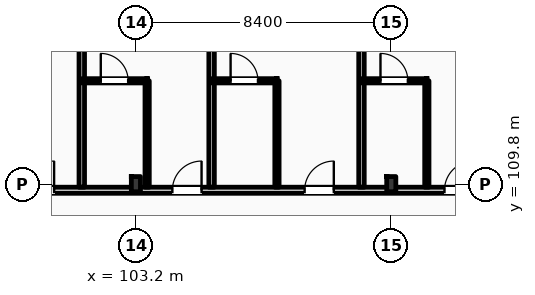
"""IFC4 building model, lengths in metres.
Left out: names, types, materials, properties, quantities, classifications, styles, units other than length and angle.
Written with IfcOpenShell. Run it as: python <this file> out.ifc"""

import sys

from ifc_helpers import new_model, si_unit, direction, frame, frame_2d, origin, origin_2d, place, context, subcontext, project, spatial, rectangle, i_section, extrude, element, fill, save


model = new_model("IFC4")
c1 = context("Model", 3, precision=1e-05, world=origin(), true_north=direction((0.0, 1.0)))
c2 = subcontext(c1, "Body", "Model", "MODEL_VIEW")
j1 = project(units=[si_unit("LENGTHUNIT", "METRE"), si_unit("PLANEANGLEUNIT", "RADIAN")], contexts=[c1])
p1 = place(None, origin())
s1 = spatial("IfcSite", under=j1, at=p1, CompositionType="ELEMENT")
p2 = place(p1, origin())
s2 = spatial("IfcBuilding", under=s1, at=p2, CompositionType="ELEMENT")
p3 = place(p2, frame((0.0, 0.0, 31.8)))
s3 = spatial("IfcBuildingStorey", under=s2, at=p3, CompositionType="ELEMENT", Elevation=31.8)
for number, where, z_axis, x_axis in (
    (1, (103.2, 109.8, 0.0), (0.0, 0.0, 1.0), (1.0, 0.0, 0.0)),
    (2, (111.6, 109.8, 0.0), (0.0, 0.0, 1.0), (1.0, 0.0, 0.0)),
):
    element("IfcColumn", number, at=place(p3, frame(where, z_axis=z_axis, x_axis=x_axis)), inside=s3, PredefinedType="COLUMN", context=c2, shape_type="SweptSolid", body=[
        extrude(i_section(OverallWidth=0.3, OverallDepth=0.5, WebThickness=0.014, FlangeThickness=0.028, FilletRadius=0.027, at=origin_2d()), origin(), (0.0, 0.0, 1.0), 3.6),
    ])
p4 = place(p3, frame((10.65, 109.6, 0.0), z_axis=(0.0, 0.0, 1.0), x_axis=(1.0, 0.0, 0.0)))
e3 = element("IfcWall", 3, at=p4, inside=s3, PredefinedType="PARTITIONING", context=c2, shape_type="SweptSolid", body=[
    extrude(rectangle(XDim=109.21, YDim=0.2, at=frame_2d((54.605, 0.0))), origin(), (0.0, 0.0, 1.0), 2.72),
])
p5 = place(p4, frame((15.825, 0.0, 0.0)))
e4 = element("IfcOpeningElement", 4, at=p5, cuts=e3, PredefinedType="OPENING", context=c2, shape_type="SweptSolid", body=[
    extrude(rectangle(XDim=1.02, YDim=2.2, at=frame_2d((0.51, 1.1))), frame((0.0, 0.11, 0.0), z_axis=(0.0, -1.0, 0.0), x_axis=(1.0, 0.0, 0.0)), (0.0, 0.0, 1.0), 0.22),
])
p6 = place(p4, frame((19.87, 0.0, 0.0)))
e5 = element("IfcOpeningElement", 5, at=p6, cuts=e3, PredefinedType="OPENING", context=c2, shape_type="SweptSolid", body=[
    extrude(rectangle(XDim=1.02, YDim=2.2, at=frame_2d((0.51, 1.1))), frame((0.0, 0.11, 0.0), z_axis=(0.0, -1.0, 0.0), x_axis=(1.0, 0.0, 0.0)), (0.0, 0.0, 1.0), 0.22),
])
p7 = place(p4, frame((24.47, 0.0, 0.0)))
e6 = element("IfcOpeningElement", 6, at=p7, cuts=e3, PredefinedType="OPENING", context=c2, shape_type="SweptSolid", body=[
    extrude(rectangle(XDim=1.02, YDim=2.2, at=frame_2d((0.51, 1.1))), frame((0.0, 0.11, 0.0), z_axis=(0.0, -1.0, 0.0), x_axis=(1.0, 0.0, 0.0)), (0.0, 0.0, 1.0), 0.22),
])
p8 = place(p4, frame((26.92, 0.0, 0.0)))
e7 = element("IfcOpeningElement", 7, at=p8, cuts=e3, PredefinedType="OPENING", context=c2, shape_type="SweptSolid", body=[
    extrude(rectangle(XDim=1.02, YDim=2.2, at=frame_2d((0.51, 1.1))), frame((0.0, 0.11, 0.0), z_axis=(0.0, -1.0, 0.0), x_axis=(1.0, 0.0, 0.0)), (0.0, 0.0, 1.0), 0.22),
])
p9 = place(p4, frame((33.7, 0.0, 0.0)))
e8 = element("IfcOpeningElement", 8, at=p9, cuts=e3, PredefinedType="OPENING", context=c2, shape_type="SweptSolid", body=[
    extrude(rectangle(XDim=0.96, YDim=2.2, at=frame_2d((0.48, 1.1))), frame((0.0, 0.11, 0.0), z_axis=(0.0, -1.0, 0.0), x_axis=(1.0, 0.0, 0.0)), (0.0, 0.0, 1.0), 0.22),
])
p10 = place(p4, frame((35.9, 0.0, 0.0)))
e9 = element("IfcOpeningElement", 9, at=p10, cuts=e3, PredefinedType="OPENING", context=c2, shape_type="SweptSolid", body=[
    extrude(rectangle(XDim=0.96, YDim=2.2, at=frame_2d((0.48, 1.1))), frame((0.0, 0.11, 0.0), z_axis=(0.0, -1.0, 0.0), x_axis=(1.0, 0.0, 0.0)), (0.0, 0.0, 1.0), 0.22),
])
p11 = place(p4, frame((42.9, 0.0, 0.0)))
e10 = element("IfcOpeningElement", 10, at=p11, cuts=e3, PredefinedType="OPENING", context=c2, shape_type="SweptSolid", body=[
    extrude(rectangle(XDim=0.96, YDim=2.2, at=frame_2d((0.48, 1.1))), frame((0.0, 0.11, 0.0), z_axis=(0.0, -1.0, 0.0), x_axis=(1.0, 0.0, 0.0)), (0.0, 0.0, 1.0), 0.22),
])
p12 = place(p4, frame((47.5, 0.0, 0.0)))
e11 = element("IfcOpeningElement", 11, at=p12, cuts=e3, PredefinedType="OPENING", context=c2, shape_type="SweptSolid", body=[
    extrude(rectangle(XDim=0.96, YDim=2.2, at=frame_2d((0.48, 1.1))), frame((0.0, 0.11, 0.0), z_axis=(0.0, -1.0, 0.0), x_axis=(1.0, 0.0, 0.0)), (0.0, 0.0, 1.0), 0.22),
])
p13 = place(p4, frame((49.95, 0.0, 0.0)))
e12 = element("IfcOpeningElement", 12, at=p13, cuts=e3, PredefinedType="OPENING", context=c2, shape_type="SweptSolid", body=[
    extrude(rectangle(XDim=0.96, YDim=2.2, at=frame_2d((0.48, 1.1))), frame((0.0, 0.11, 0.0), z_axis=(0.0, -1.0, 0.0), x_axis=(1.0, 0.0, 0.0)), (0.0, 0.0, 1.0), 0.22),
])
p14 = place(p4, frame((56.7, 0.0, 0.0)))
e13 = element("IfcOpeningElement", 13, at=p14, cuts=e3, PredefinedType="OPENING", context=c2, shape_type="SweptSolid", body=[
    extrude(rectangle(XDim=0.96, YDim=2.2, at=frame_2d((0.48, 1.1))), frame((0.0, 0.11, 0.0), z_axis=(0.0, -1.0, 0.0), x_axis=(1.0, 0.0, 0.0)), (0.0, 0.0, 1.0), 0.22),
])
p15 = place(p4, frame((59.15, 0.0, 0.0)))
e14 = element("IfcOpeningElement", 14, at=p15, cuts=e3, PredefinedType="OPENING", context=c2, shape_type="SweptSolid", body=[
    extrude(rectangle(XDim=0.96, YDim=2.2, at=frame_2d((0.48, 1.1))), frame((0.0, 0.11, 0.0), z_axis=(0.0, -1.0, 0.0), x_axis=(1.0, 0.0, 0.0)), (0.0, 0.0, 1.0), 0.22),
])
p16 = place(p4, frame((65.9, 0.0, 0.0)))
e15 = element("IfcOpeningElement", 15, at=p16, cuts=e3, PredefinedType="OPENING", context=c2, shape_type="SweptSolid", body=[
    extrude(rectangle(XDim=0.96, YDim=2.2, at=frame_2d((0.48, 1.1))), frame((0.0, 0.11, 0.0), z_axis=(0.0, -1.0, 0.0), x_axis=(1.0, 0.0, 0.0)), (0.0, 0.0, 1.0), 0.22),
])
p17 = place(p4, frame((70.5, 0.0, 0.0)))
e16 = element("IfcOpeningElement", 16, at=p17, cuts=e3, PredefinedType="OPENING", context=c2, shape_type="SweptSolid", body=[
    extrude(rectangle(XDim=0.96, YDim=2.2, at=frame_2d((0.48, 1.1))), frame((0.0, 0.11, 0.0), z_axis=(0.0, -1.0, 0.0), x_axis=(1.0, 0.0, 0.0)), (0.0, 0.0, 1.0), 0.22),
])
p18 = place(p4, frame((72.95, 0.0, 0.0)))
e17 = element("IfcOpeningElement", 17, at=p18, cuts=e3, PredefinedType="OPENING", context=c2, shape_type="SweptSolid", body=[
    extrude(rectangle(XDim=0.96, YDim=2.2, at=frame_2d((0.48, 1.1))), frame((0.0, 0.11, 0.0), z_axis=(0.0, -1.0, 0.0), x_axis=(1.0, 0.0, 0.0)), (0.0, 0.0, 1.0), 0.22),
])
p19 = place(p4, frame((79.7, 0.0, 0.0)))
e18 = element("IfcOpeningElement", 18, at=p19, cuts=e3, PredefinedType="OPENING", context=c2, shape_type="SweptSolid", body=[
    extrude(rectangle(XDim=0.96, YDim=2.2, at=frame_2d((0.48, 1.1))), frame((0.0, 0.11, 0.0), z_axis=(0.0, -1.0, 0.0), x_axis=(1.0, 0.0, 0.0)), (0.0, 0.0, 1.0), 0.22),
])
p20 = place(p4, frame((82.15, 0.0, 0.0)))
e19 = element("IfcOpeningElement", 19, at=p20, cuts=e3, PredefinedType="OPENING", context=c2, shape_type="SweptSolid", body=[
    extrude(rectangle(XDim=0.96, YDim=2.2, at=frame_2d((0.48, 1.1))), frame((0.0, 0.11, 0.0), z_axis=(0.0, -1.0, 0.0), x_axis=(1.0, 0.0, 0.0)), (0.0, 0.0, 1.0), 0.22),
])
p21 = place(p4, frame((88.9, 0.0, 0.0)))
e20 = element("IfcOpeningElement", 20, at=p21, cuts=e3, PredefinedType="OPENING", context=c2, shape_type="SweptSolid", body=[
    extrude(rectangle(XDim=0.96, YDim=2.2, at=frame_2d((0.48, 1.1))), frame((0.0, 0.11, 0.0), z_axis=(0.0, -1.0, 0.0), x_axis=(1.0, 0.0, 0.0)), (0.0, 0.0, 1.0), 0.22),
])
p22 = place(p4, frame((93.75, 0.0, 0.0)))
e21 = element("IfcOpeningElement", 21, at=p22, cuts=e3, PredefinedType="OPENING", context=c2, shape_type="SweptSolid", body=[
    extrude(rectangle(XDim=0.96, YDim=2.2, at=frame_2d((0.48, 1.1))), frame((0.0, 0.11, 0.0), z_axis=(0.0, -1.0, 0.0), x_axis=(1.0, 0.0, 0.0)), (0.0, 0.0, 1.0), 0.22),
])
p23 = place(p4, frame((98.1, 0.0, 0.0)))
e22 = element("IfcOpeningElement", 22, at=p23, cuts=e3, PredefinedType="OPENING", context=c2, shape_type="SweptSolid", body=[
    extrude(rectangle(XDim=0.96, YDim=2.2, at=frame_2d((0.48, 1.1))), frame((0.0, 0.11, 0.0), z_axis=(0.0, -1.0, 0.0), x_axis=(1.0, 0.0, 0.0)), (0.0, 0.0, 1.0), 0.22),
])
p24 = place(p4, frame((102.7, 0.0, 0.0)))
e23 = element("IfcOpeningElement", 23, at=p24, cuts=e3, PredefinedType="OPENING", context=c2, shape_type="SweptSolid", body=[
    extrude(rectangle(XDim=0.96, YDim=2.2, at=frame_2d((0.48, 1.1))), frame((0.0, 0.11, 0.0), z_axis=(0.0, -1.0, 0.0), x_axis=(1.0, 0.0, 0.0)), (0.0, 0.0, 1.0), 0.22),
])
p25 = place(p4, frame((105.04, 0.0, 0.0)))
e24 = element("IfcOpeningElement", 24, at=p25, cuts=e3, PredefinedType="OPENING", context=c2, shape_type="SweptSolid", body=[
    extrude(rectangle(XDim=0.96, YDim=2.2, at=frame_2d((0.48, 1.1))), frame((0.0, 0.11, 0.0), z_axis=(0.0, -1.0, 0.0), x_axis=(1.0, 0.0, 0.0)), (0.0, 0.0, 1.0), 0.22),
])
p26 = place(p4, frame((2.716, 0.0, 0.0)))
e25 = element("IfcOpeningElement", 25, at=p26, cuts=e3, PredefinedType="OPENING", context=c2, shape_type="SweptSolid", body=[
    extrude(rectangle(XDim=1.35, YDim=2.25, at=frame_2d((0.675, 1.125))), frame((0.0, 0.11, 0.0), z_axis=(0.0, -1.0, 0.0), x_axis=(1.0, 0.0, 0.0)), (0.0, 0.0, 1.0), 0.22),
])
p27 = place(p4, frame((6.65, 0.0, 0.0)))
e26 = element("IfcOpeningElement", 26, at=p27, cuts=e3, PredefinedType="OPENING", context=c2, shape_type="SweptSolid", body=[
    extrude(rectangle(XDim=1.35, YDim=2.25, at=frame_2d((0.675, 1.125))), frame((0.0, 0.11, 0.0), z_axis=(0.0, -1.0, 0.0), x_axis=(1.0, 0.0, 0.0)), (0.0, 0.0, 1.0), 0.22),
])
p28 = place(p4, frame((10.583, 0.0, 0.0)))
e27 = element("IfcOpeningElement", 27, at=p28, cuts=e3, PredefinedType="OPENING", context=c2, shape_type="SweptSolid", body=[
    extrude(rectangle(XDim=1.35, YDim=2.25, at=frame_2d((0.675, 1.125))), frame((0.0, 0.11, 0.0), z_axis=(0.0, -1.0, 0.0), x_axis=(1.0, 0.0, 0.0)), (0.0, 0.0, 1.0), 0.22),
])
for number, where, z_axis, x_axis in (
    (28, (101.42, 109.7, 0.0), (0.0, 0.0, 1.0), (0.0, 1.0, 0.0)),
    (29, (105.69, 109.7, 0.0), (0.0, 0.0, 1.0), (0.0, 1.0, 0.0)),
):
    element("IfcWall", number, at=place(p3, frame(where, z_axis=z_axis, x_axis=x_axis)), inside=s3, PredefinedType="PARTITIONING", context=c2, shape_type="SweptSolid", body=[
        extrude(rectangle(XDim=8.15, YDim=0.18, at=frame_2d((4.075, 0.0))), origin(), (0.0, 0.0, 1.0), 3.36),
    ])
p29 = place(p3, frame((103.57, 109.7, 0.0), z_axis=(0.0, 0.0, 1.0), x_axis=(0.0, 1.0, 0.0)))
e30 = element("IfcWall", 30, at=p29, inside=s3, PredefinedType="PARTITIONING", context=c2, shape_type="SweptSolid", body=[
    extrude(rectangle(XDim=3.5, YDim=0.14, at=frame_2d((1.75, 0.0))), origin(), (0.0, 0.0, 1.0), 3.36),
])
p30 = place(p3, frame((101.42, 113.2, 0.0), z_axis=(0.0, 0.0, 1.0), x_axis=(1.0, 0.0, 0.0)))
e31 = element("IfcWall", 31, at=p30, inside=s3, PredefinedType="PARTITIONING", context=c2, shape_type="SweptSolid", body=[
    extrude(rectangle(XDim=2.15, YDim=0.14, at=frame_2d((1.075, 0.0))), origin(), (0.0, 0.0, 1.0), 3.36),
])
p31 = place(p30, frame((0.625, 0.0, 0.0)))
e32 = element("IfcOpeningElement", 32, at=p31, cuts=e31, PredefinedType="OPENING", context=c2, shape_type="SweptSolid", body=[
    extrude(rectangle(XDim=0.9, YDim=2.1, at=frame_2d((0.45, 1.05))), frame((0.0, 0.08, 0.0), z_axis=(0.0, -1.0, 0.0), x_axis=(1.0, 0.0, 0.0)), (0.0, 0.0, 1.0), 0.16),
])
p32 = place(p3, frame((110.62, 109.7, 0.0), z_axis=(0.0, 0.0, 1.0), x_axis=(0.0, 1.0, 0.0)))
e33 = element("IfcWall", 33, at=p32, inside=s3, PredefinedType="PARTITIONING", context=c2, shape_type="SweptSolid", body=[
    extrude(rectangle(XDim=8.15, YDim=0.18, at=frame_2d((4.075, 0.0))), origin(), (0.0, 0.0, 1.0), 3.36),
])
p33 = place(p3, frame((107.84, 109.7, 0.0), z_axis=(0.0, 0.0, 1.0), x_axis=(0.0, 1.0, 0.0)))
e34 = element("IfcWall", 34, at=p33, inside=s3, PredefinedType="PARTITIONING", context=c2, shape_type="SweptSolid", body=[
    extrude(rectangle(XDim=3.5, YDim=0.14, at=frame_2d((1.75, 0.0))), origin(), (0.0, 0.0, 1.0), 3.36),
])
p34 = place(p3, frame((105.69, 113.2, 0.0), z_axis=(0.0, 0.0, 1.0), x_axis=(1.0, 0.0, 0.0)))
e35 = element("IfcWall", 35, at=p34, inside=s3, PredefinedType="PARTITIONING", context=c2, shape_type="SweptSolid", body=[
    extrude(rectangle(XDim=2.15, YDim=0.14, at=frame_2d((1.075, 0.0))), origin(), (0.0, 0.0, 1.0), 3.36),
])
p35 = place(p34, frame((0.625, 0.0, 0.0)))
e36 = element("IfcOpeningElement", 36, at=p35, cuts=e35, PredefinedType="OPENING", context=c2, shape_type="SweptSolid", body=[
    extrude(rectangle(XDim=0.9, YDim=2.1, at=frame_2d((0.45, 1.05))), frame((0.0, 0.08, 0.0), z_axis=(0.0, -1.0, 0.0), x_axis=(1.0, 0.0, 0.0)), (0.0, 0.0, 1.0), 0.16),
])
p36 = place(p3, frame((112.77, 109.7, 0.0), z_axis=(0.0, 0.0, 1.0), x_axis=(0.0, 1.0, 0.0)))
e37 = element("IfcWall", 37, at=p36, inside=s3, PredefinedType="PARTITIONING", context=c2, shape_type="SweptSolid", body=[
    extrude(rectangle(XDim=3.5, YDim=0.14, at=frame_2d((1.75, 0.0))), origin(), (0.0, 0.0, 1.0), 3.36),
])
p37 = place(p3, frame((110.62, 113.2, 0.0), z_axis=(0.0, 0.0, 1.0), x_axis=(1.0, 0.0, 0.0)))
e38 = element("IfcWall", 38, at=p37, inside=s3, PredefinedType="PARTITIONING", context=c2, shape_type="SweptSolid", body=[
    extrude(rectangle(XDim=2.15, YDim=0.14, at=frame_2d((1.075, 0.0))), origin(), (0.0, 0.0, 1.0), 3.36),
])
p38 = place(p37, frame((0.625, 0.0, 0.0)))
e39 = element("IfcOpeningElement", 39, at=p38, cuts=e38, PredefinedType="OPENING", context=c2, shape_type="SweptSolid", body=[
    extrude(rectangle(XDim=0.9, YDim=2.1, at=frame_2d((0.45, 1.05))), frame((0.0, 0.08, 0.0), z_axis=(0.0, -1.0, 0.0), x_axis=(1.0, 0.0, 0.0)), (0.0, 0.0, 1.0), 0.16),
])
p39 = place(p21, origin())
e40 = element("IfcDoor", 40, at=p39, inside=s3, OperationType="SINGLE_SWING_RIGHT", PredefinedType="DOOR", context=c2, shape_type="SweptSolid", body=[
    extrude(rectangle(XDim=0.96, YDim=2.2, at=frame_2d((0.48, 1.1))), frame((0.0, 0.025, 0.0), z_axis=(0.0, -1.0, 0.0), x_axis=(1.0, 0.0, 0.0)), (0.0, 0.0, 1.0), 0.05),
])
fill(e20, e40)
p40 = place(p22, origin())
e41 = element("IfcDoor", 41, at=p40, inside=s3, OperationType="SINGLE_SWING_RIGHT", PredefinedType="DOOR", context=c2, shape_type="SweptSolid", body=[
    extrude(rectangle(XDim=0.96, YDim=2.2, at=frame_2d((0.48, 1.1))), frame((0.0, 0.025, 0.0), z_axis=(0.0, -1.0, 0.0), x_axis=(1.0, 0.0, 0.0)), (0.0, 0.0, 1.0), 0.05),
])
fill(e21, e41)
p41 = place(p31, origin())
e42 = element("IfcDoor", 42, at=p41, inside=s3, OperationType="SINGLE_SWING_LEFT", PredefinedType="DOOR", context=c2, shape_type="SweptSolid", body=[
    extrude(rectangle(XDim=0.9, YDim=2.1, at=frame_2d((0.45, 1.05))), frame((0.0, 0.025, 0.0), z_axis=(0.0, -1.0, 0.0), x_axis=(1.0, 0.0, 0.0)), (0.0, 0.0, 1.0), 0.05),
])
fill(e32, e42)
p42 = place(p23, origin())
e43 = element("IfcDoor", 43, at=p42, inside=s3, OperationType="SINGLE_SWING_RIGHT", PredefinedType="DOOR", context=c2, shape_type="SweptSolid", body=[
    extrude(rectangle(XDim=0.96, YDim=2.2, at=frame_2d((0.48, 1.1))), frame((0.0, 0.025, 0.0), z_axis=(0.0, -1.0, 0.0), x_axis=(1.0, 0.0, 0.0)), (0.0, 0.0, 1.0), 0.05),
])
fill(e22, e43)
p43 = place(p35, origin())
e44 = element("IfcDoor", 44, at=p43, inside=s3, OperationType="SINGLE_SWING_LEFT", PredefinedType="DOOR", context=c2, shape_type="SweptSolid", body=[
    extrude(rectangle(XDim=0.9, YDim=2.1, at=frame_2d((0.45, 1.05))), frame((0.0, 0.025, 0.0), z_axis=(0.0, -1.0, 0.0), x_axis=(1.0, 0.0, 0.0)), (0.0, 0.0, 1.0), 0.05),
])
fill(e36, e44)
p44 = place(p24, origin())
e45 = element("IfcDoor", 45, at=p44, inside=s3, OperationType="SINGLE_SWING_RIGHT", PredefinedType="DOOR", context=c2, shape_type="SweptSolid", body=[
    extrude(rectangle(XDim=0.96, YDim=2.2, at=frame_2d((0.48, 1.1))), frame((0.0, 0.025, 0.0), z_axis=(0.0, -1.0, 0.0), x_axis=(1.0, 0.0, 0.0)), (0.0, 0.0, 1.0), 0.05),
])
fill(e23, e45)
p45 = place(p38, origin())
e46 = element("IfcDoor", 46, at=p45, inside=s3, OperationType="SINGLE_SWING_LEFT", PredefinedType="DOOR", context=c2, shape_type="SweptSolid", body=[
    extrude(rectangle(XDim=0.9, YDim=2.1, at=frame_2d((0.45, 1.05))), frame((0.0, 0.025, 0.0), z_axis=(0.0, -1.0, 0.0), x_axis=(1.0, 0.0, 0.0)), (0.0, 0.0, 1.0), 0.05),
])
fill(e39, e46)
save(model, sys.argv[1])
